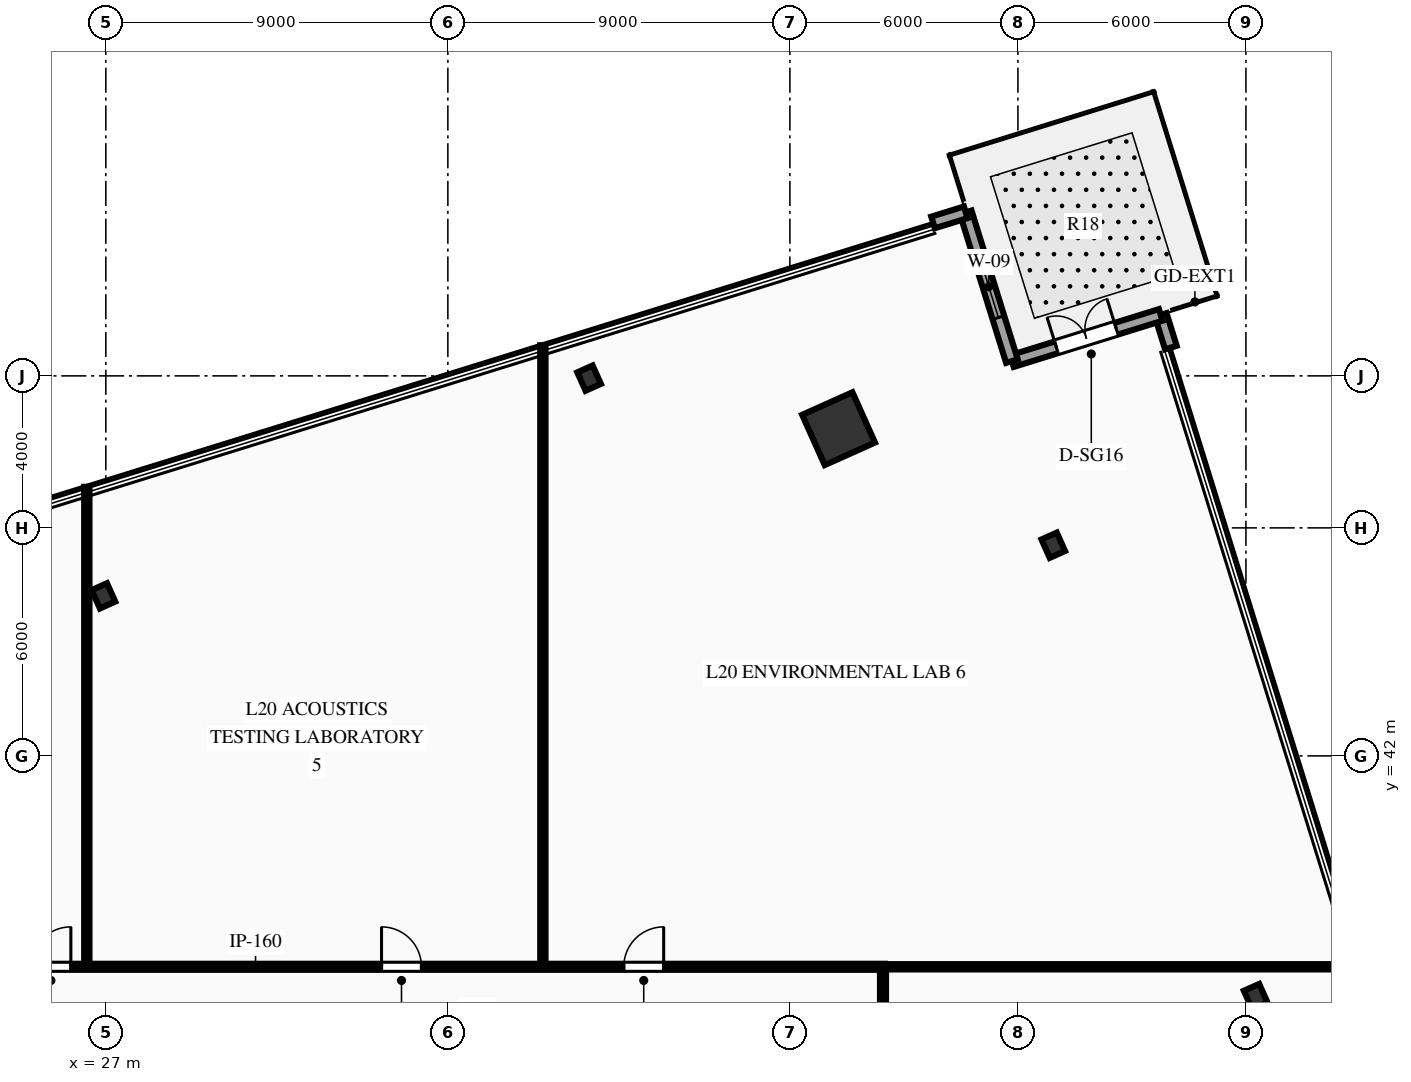
"""IFC4 building model, lengths in metres.
Left out: names, types, materials, properties, quantities, classifications, styles, units other than length and angle.
Written with IfcOpenShell. Run it as: python <this file> out.ifc"""

import sys

from ifc_helpers import new_model, si_unit, direction, frame, frame_2d, origin, origin_2d, place, context, subcontext, project, spatial, rectangle, hollow_rectangle, i_section, extrude, element, fill, save


model = new_model("IFC4")
c1 = context("Model", 3, precision=1e-05, world=origin(), true_north=direction((0.0, 1.0)))
c2 = subcontext(c1, "Body", "Model", "MODEL_VIEW")
j1 = project(units=[si_unit("LENGTHUNIT", "METRE"), si_unit("PLANEANGLEUNIT", "RADIAN")], contexts=[c1])
p1 = place(None, origin())
s1 = spatial("IfcSite", under=j1, at=p1, CompositionType="ELEMENT")
p2 = place(p1, origin())
s2 = spatial("IfcBuilding", under=s1, at=p2, CompositionType="ELEMENT")
p3 = place(p2, frame((0.0, 0.0, 85.95)))
s3 = spatial("IfcBuildingStorey", under=s2, at=p3, CompositionType="ELEMENT", Elevation=85.95)
p4 = place(p3, frame((46.281, 50.61, 0.0), z_axis=(0.0, 0.0, 1.0), x_axis=(0.912477494148, 0.409126902895, 0.0)))
e1 = element("IfcColumn", 1, at=p4, inside=s3, PredefinedType="COLUMN", context=c2, shape_type="SweptSolid", body=[
    extrude(hollow_rectangle(XDim=1.45, YDim=1.45, WallThickness=0.07, at=origin_2d()), origin(), (0.0, 0.0, 1.0), 4.5),
])
for number, where, z_axis, x_axis in (
    (2, (57.255, 35.667, 0.0), (0.0, 0.0, 1.0), (0.912, 0.409, 0.0)),
    (3, (51.93, 47.543, 0.0), (0.0, 0.0, 1.0), (0.912, 0.409, 0.0)),
    (4, (39.716, 51.941, 0.0), (0.0, 0.0, 1.0), (0.912, 0.409, 0.0)),
    (5, (26.938, 46.211, 0.0), (0.0, 0.0, 1.0), (0.912, 0.409, 0.0)),
):
    element("IfcColumn", number, at=place(p3, frame(where, z_axis=z_axis, x_axis=x_axis)), inside=s3, PredefinedType="COLUMN", context=c2, shape_type="SweptSolid", body=[
        extrude(i_section(OverallWidth=0.442, OverallDepth=0.531, WebThickness=0.066, FlangeThickness=0.106, at=origin_2d()), origin(), (0.0, 0.0, 1.0), 4.5),
    ])
p5 = place(p3, frame((54.758, 53.604, 0.0), z_axis=(0.0, 0.0, 1.0), x_axis=(0.296544284053, -0.955019103262, 0.0)))
e6 = element("IfcWall", 6, at=p5, inside=s3, PredefinedType="STANDARD", context=c2, shape_type="SweptSolid", body=[
    extrude(rectangle(XDim=0.9, YDim=0.32, at=frame_2d((0.45, 0.0))), origin(), (0.0, 0.0, 1.0), 4.2),
])
p6 = place(p3, frame((50.842, 52.388, 0.0), z_axis=(0.0, 0.0, 1.0), x_axis=(0.955024023145, 0.296528439134, 0.0)))
e7 = element("IfcWall", 7, at=p6, inside=s3, PredefinedType="STANDARD", context=c2, shape_type="SweptSolid", body=[
    extrude(rectangle(XDim=4.1, YDim=0.32, at=frame_2d((2.05, 0.0))), origin(), (0.0, 0.0, 1.0), 4.2),
])
p7 = place(p6, frame((1.225, 0.0, 0.0)))
e8 = element("IfcOpeningElement", 8, at=p7, cuts=e7, PredefinedType="OPENING", context=c2, shape_type="SweptSolid", body=[
    extrude(rectangle(XDim=1.65, YDim=2.35, at=frame_2d((0.825, 1.175))), frame((0.0, 0.17, 0.0), z_axis=(0.0, -1.0, 0.0), x_axis=(1.0, 0.0, 0.0)), (0.0, 0.0, 1.0), 0.34),
])
p8 = place(p3, frame((49.627, 56.304, 0.0), z_axis=(0.0, 0.0, 1.0), x_axis=(0.296474129471, -0.955040884232, 0.0)))
e9 = element("IfcWall", 9, at=p8, inside=s3, PredefinedType="STANDARD", context=c2, shape_type="SweptSolid", body=[
    extrude(rectangle(XDim=4.1, YDim=0.32, at=frame_2d((2.05, 0.0))), origin(), (0.0, 0.0, 1.0), 4.2),
])
p9 = place(p8, frame((1.2, 0.0, 0.75)))
e10 = element("IfcOpeningElement", 10, at=p9, cuts=e9, PredefinedType="OPENING", context=c2, shape_type="SweptSolid", body=[
    extrude(rectangle(XDim=1.7, YDim=2.5, at=frame_2d((0.85, 1.25))), frame((0.0, 0.17, 0.0), z_axis=(0.0, -1.0, 0.0), x_axis=(1.0, 0.0, 0.0)), (0.0, 0.0, 1.0), 0.34),
])
p10 = place(p3, frame((48.767, 56.037, 0.0), z_axis=(0.0, 0.0, 1.0), x_axis=(0.955042952788, 0.296467465889, 0.0)))
e11 = element("IfcWall", 11, at=p10, inside=s3, PredefinedType="STANDARD", context=c2, shape_type="SweptSolid", body=[
    extrude(rectangle(XDim=0.9, YDim=0.32, at=frame_2d((0.45, 0.0))), origin(), (0.0, 0.0, 1.0), 4.2),
])
p11 = place(p3, frame((24.5, 36.45, 0.0), z_axis=(0.0, 0.0, 1.0), x_axis=(1.0, 0.0, 0.0)))
e12 = element("IfcWall", 12, at=p11, inside=s3, PredefinedType="PARTITIONING", context=c2, shape_type="SweptSolid", body=[
    extrude(rectangle(XDim=23.0, YDim=0.16, at=frame_2d((11.5, 0.0))), origin(), (0.0, 0.0, 1.0), 4.2),
])
p12 = place(p11, frame((0.53, 0.0, 0.0)))
e13 = element("IfcOpeningElement", 13, at=p12, cuts=e12, PredefinedType="OPENING", context=c2, shape_type="SweptSolid", body=[
    extrude(rectangle(XDim=1.05, YDim=2.15, at=frame_2d((0.525, 1.075))), frame((0.0, 0.09, 0.0), z_axis=(0.0, -1.0, 0.0), x_axis=(1.0, 0.0, 0.0)), (0.0, 0.0, 1.0), 0.18),
])
p13 = place(p11, frame((9.755, 0.0, 0.0)))
e14 = element("IfcOpeningElement", 14, at=p13, cuts=e12, PredefinedType="OPENING", context=c2, shape_type="SweptSolid", body=[
    extrude(rectangle(XDim=1.05, YDim=2.15, at=frame_2d((0.525, 1.075))), frame((0.0, 0.09, 0.0), z_axis=(0.0, -1.0, 0.0), x_axis=(1.0, 0.0, 0.0)), (0.0, 0.0, 1.0), 0.18),
])
p14 = place(p11, frame((16.129, 0.0, 0.0)))
e15 = element("IfcOpeningElement", 15, at=p14, cuts=e12, PredefinedType="OPENING", context=c2, shape_type="SweptSolid", body=[
    extrude(rectangle(XDim=1.05, YDim=2.15, at=frame_2d((0.525, 1.075))), frame((0.0, 0.09, 0.0), z_axis=(0.0, -1.0, 0.0), x_axis=(1.0, 0.0, 0.0)), (0.0, 0.0, 1.0), 0.18),
])
p15 = place(p3, frame((47.45, 15.55, 0.0), z_axis=(0.0, 0.0, 1.0), x_axis=(0.0, 1.0, 0.0)))
e16 = element("IfcWall", 16, at=p15, inside=s3, PredefinedType="PARTITIONING", context=c2, shape_type="SweptSolid", body=[
    extrude(rectangle(XDim=20.9, YDim=0.16, at=frame_2d((10.45, 0.0))), origin(), (0.0, 0.0, 1.0), 4.2),
])
p16 = place(p15, frame((4.087, 0.0, 0.0)))
e17 = element("IfcOpeningElement", 17, at=p16, cuts=e16, PredefinedType="OPENING", context=c2, shape_type="SweptSolid", body=[
    extrude(rectangle(XDim=1.05, YDim=2.15, at=frame_2d((0.525, 1.075))), frame((0.0, 0.09, 0.0), z_axis=(0.0, -1.0, 0.0), x_axis=(1.0, 0.0, 0.0)), (0.0, 0.0, 1.0), 0.18),
])
p17 = place(p15, frame((7.885, 0.0, 0.0)))
e18 = element("IfcOpeningElement", 18, at=p17, cuts=e16, PredefinedType="OPENING", context=c2, shape_type="SweptSolid", body=[
    extrude(rectangle(XDim=1.05, YDim=2.15, at=frame_2d((0.525, 1.075))), frame((0.0, 0.09, 0.0), z_axis=(0.0, -1.0, 0.0), x_axis=(1.0, 0.0, 0.0)), (0.0, 0.0, 1.0), 0.18),
])
p18 = place(p15, frame((14.743, 0.0, 0.0)))
e19 = element("IfcOpeningElement", 19, at=p18, cuts=e16, PredefinedType="OPENING", context=c2, shape_type="SweptSolid", body=[
    extrude(rectangle(XDim=1.05, YDim=2.15, at=frame_2d((0.525, 1.075))), frame((0.0, 0.09, 0.0), z_axis=(0.0, -1.0, 0.0), x_axis=(1.0, 0.0, 0.0)), (0.0, 0.0, 1.0), 0.18),
])
p19 = place(p3, frame((47.45, 36.45, 0.0), z_axis=(0.0, 0.0, 1.0), x_axis=(1.0, 0.0, 0.0)))
e20 = element("IfcWall", 20, at=p19, inside=s3, PredefinedType="PARTITIONING", context=c2, shape_type="SweptSolid", body=[
    extrude(rectangle(XDim=12.593, YDim=0.14, at=frame_2d((6.296, 0.0))), origin(), (0.0, 0.0, 1.0), 4.2),
])
p20 = place(p3, frame((26.5, 36.45, 0.0), z_axis=(0.0, 0.0, 1.0), x_axis=(0.0, 1.0, 0.0)))
e21 = element("IfcWall", 21, at=p20, inside=s3, PredefinedType="PARTITIONING", context=c2, shape_type="SweptSolid", body=[
    extrude(rectangle(XDim=12.631, YDim=0.14, at=frame_2d((6.315, 0.0))), origin(), (0.0, 0.0, 1.0), 4.2),
])
p21 = place(p3, frame((38.5, 36.45, 0.0), z_axis=(0.0, 0.0, 1.0), x_axis=(0.0, 1.0, 0.0)))
e22 = element("IfcWall", 22, at=p21, inside=s3, PredefinedType="PARTITIONING", context=c2, shape_type="SweptSolid", body=[
    extrude(rectangle(XDim=16.357, YDim=0.14, at=frame_2d((8.179, 0.0))), origin(), (0.0, 0.0, 1.0), 4.2),
])
p22 = place(p7, origin())
e23 = element("IfcDoor", 23, at=p22, inside=s3, OperationType="DOUBLE_DOOR_SINGLE_SWING", PredefinedType="DOOR", context=c2, shape_type="SweptSolid", body=[
    extrude(rectangle(XDim=1.65, YDim=2.35, at=frame_2d((0.825, 1.175))), frame((0.0, 0.025, 0.0), z_axis=(0.0, -1.0, 0.0), x_axis=(1.0, 0.0, 0.0)), (0.0, 0.0, 1.0), 0.05),
])
fill(e8, e23)
p23 = place(p9, origin())
e24 = element("IfcWindow", 24, at=p23, inside=s3, PartitioningType="SINGLE_PANEL", PredefinedType="WINDOW", context=c2, shape_type="SweptSolid", body=[
    extrude(rectangle(XDim=1.7, YDim=2.5, at=frame_2d((0.85, 1.25))), frame((0.0, 0.03, 0.0), z_axis=(0.0, -1.0, 0.0), x_axis=(1.0, 0.0, 0.0)), (0.0, 0.0, 1.0), 0.06),
])
fill(e10, e24)
p24 = place(p12, origin())
e25 = element("IfcDoor", 25, at=p24, inside=s3, OperationType="SINGLE_SWING_RIGHT", PredefinedType="DOOR", context=c2, shape_type="SweptSolid", body=[
    extrude(rectangle(XDim=1.05, YDim=2.15, at=frame_2d((0.525, 1.075))), frame((0.0, 0.025, 0.0), z_axis=(0.0, -1.0, 0.0), x_axis=(1.0, 0.0, 0.0)), (0.0, 0.0, 1.0), 0.05),
])
fill(e13, e25)
p25 = place(p13, origin())
e26 = element("IfcDoor", 26, at=p25, inside=s3, OperationType="SINGLE_SWING_LEFT", PredefinedType="DOOR", context=c2, shape_type="SweptSolid", body=[
    extrude(rectangle(XDim=1.05, YDim=2.15, at=frame_2d((0.525, 1.075))), frame((0.0, 0.025, 0.0), z_axis=(0.0, -1.0, 0.0), x_axis=(1.0, 0.0, 0.0)), (0.0, 0.0, 1.0), 0.05),
])
fill(e14, e26)
p26 = place(p14, origin())
e27 = element("IfcDoor", 27, at=p26, inside=s3, OperationType="SINGLE_SWING_RIGHT", PredefinedType="DOOR", context=c2, shape_type="SweptSolid", body=[
    extrude(rectangle(XDim=1.05, YDim=2.15, at=frame_2d((0.525, 1.075))), frame((0.0, 0.025, 0.0), z_axis=(0.0, -1.0, 0.0), x_axis=(1.0, 0.0, 0.0)), (0.0, 0.0, 1.0), 0.05),
])
fill(e15, e27)
save(model, sys.argv[1])
